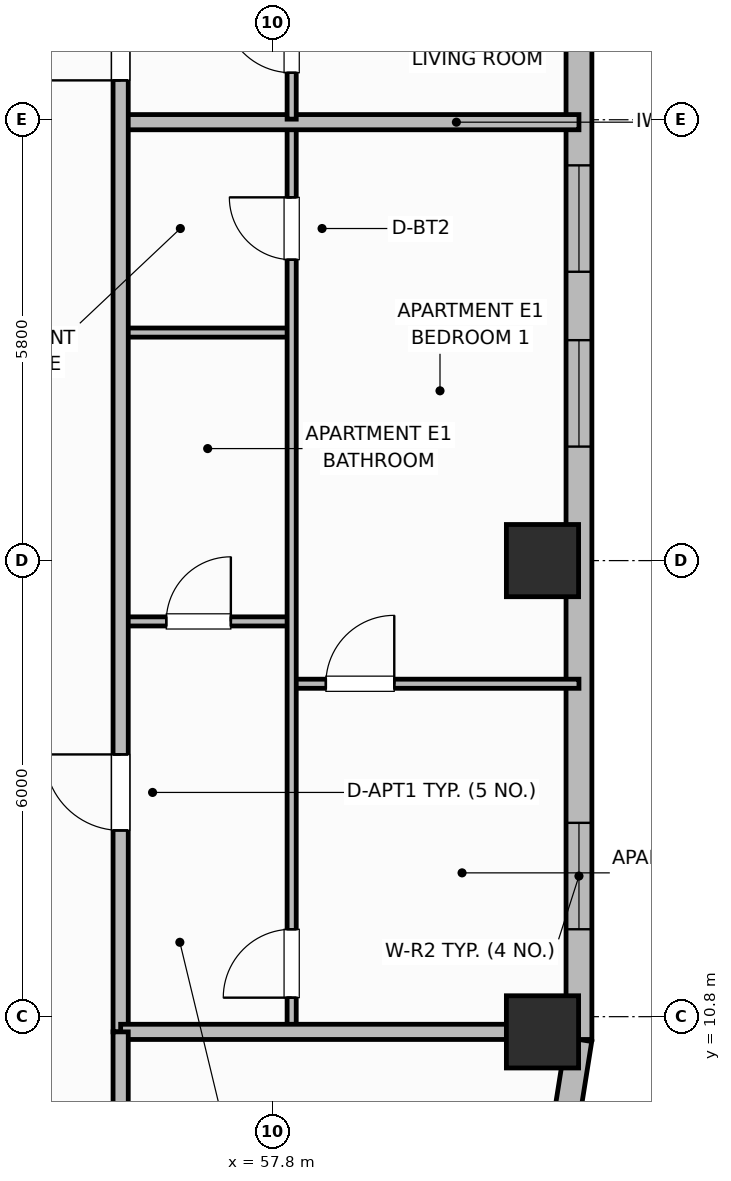
"""IFC4 building model, lengths in metres.
Left out: names, types, materials, properties, quantities, classifications, styles, units other than length and angle.
Written with IfcOpenShell. Run it as: python <this file> out.ifc"""

import sys

from ifc_helpers import new_model, si_unit, direction, frame, frame_2d, origin, origin_2d, place, context, subcontext, project, spatial, rectangle, extrude, element, fill, save


model = new_model("IFC4")
c1 = context("Model", 3, precision=1e-05, world=origin(), true_north=direction((0.0, 1.0)))
c2 = subcontext(c1, "Body", "Model", "MODEL_VIEW")
j1 = project(units=[si_unit("LENGTHUNIT", "METRE"), si_unit("PLANEANGLEUNIT", "RADIAN")], contexts=[c1])
p1 = place(None, origin())
s1 = spatial("IfcSite", under=j1, at=p1, CompositionType="ELEMENT")
p2 = place(p1, origin())
s2 = spatial("IfcBuilding", under=s1, at=p2, CompositionType="ELEMENT")
p3 = place(p2, frame((0.0, 0.0, 147.8)))
s3 = spatial("IfcBuildingStorey", under=s2, at=p3, CompositionType="ELEMENT", Elevation=147.8)
for number, where, z_axis, x_axis in (
    (1, (61.35, 10.6, 0.0), (0.0, 0.0, 1.0), (1.0, 0.0, 0.0)),
    (2, (61.35, 16.8, 0.0), (0.0, 0.0, 1.0), (1.0, 0.0, 0.0)),
):
    element("IfcColumn", number, at=place(p3, frame(where, z_axis=z_axis, x_axis=x_axis)), inside=s3, PredefinedType="COLUMN", context=c2, shape_type="SweptSolid", body=[
        extrude(rectangle(XDim=0.95, YDim=0.95, at=origin_2d()), origin(), (0.0, 0.0, 1.0), 3.7),
    ])
p4 = place(p3, frame((61.652, 9.378, 0.0), z_axis=(0.0, 0.0, 1.0), x_axis=(0.156514556949, 0.987675651954, 0.0)))
e3 = element("IfcWall", 3, at=p4, inside=s3, PredefinedType="SOLIDWALL", context=c2, shape_type="SweptSolid", body=[
    extrude(rectangle(XDim=1.135, YDim=0.34, at=frame_2d((0.568, 0.0))), origin(), (0.0, 0.0, 1.0), 2.72),
])
p5 = place(p3, frame((61.83, 10.5, 0.0), z_axis=(0.0, 0.0, 1.0), x_axis=(0.0, 1.0, 0.0)))
e4 = element("IfcWall", 4, at=p5, inside=s3, PredefinedType="SOLIDWALL", context=c2, shape_type="SweptSolid", body=[
    extrude(rectangle(XDim=13.3, YDim=0.34, at=frame_2d((6.65, 0.0))), origin(), (0.0, 0.0, 1.0), 2.72),
])
p6 = place(p5, frame((1.45, 0.0, 0.75)))
e5 = element("IfcOpeningElement", 5, at=p6, cuts=e4, PredefinedType="OPENING", context=c2, shape_type="SweptSolid", body=[
    extrude(rectangle(XDim=1.4, YDim=1.85, at=frame_2d((0.7, 0.925))), frame((0.0, 0.18, 0.0), z_axis=(0.0, -1.0, 0.0), x_axis=(1.0, 0.0, 0.0)), (0.0, 0.0, 1.0), 0.36),
])
p7 = place(p5, frame((7.8, 0.0, 0.75)))
e6 = element("IfcOpeningElement", 6, at=p7, cuts=e4, PredefinedType="OPENING", context=c2, shape_type="SweptSolid", body=[
    extrude(rectangle(XDim=1.4, YDim=1.85, at=frame_2d((0.7, 0.925))), frame((0.0, 0.18, 0.0), z_axis=(0.0, -1.0, 0.0), x_axis=(1.0, 0.0, 0.0)), (0.0, 0.0, 1.0), 0.36),
])
p8 = place(p5, frame((10.1, 0.0, 0.75)))
e7 = element("IfcOpeningElement", 7, at=p8, cuts=e4, PredefinedType="OPENING", context=c2, shape_type="SweptSolid", body=[
    extrude(rectangle(XDim=1.4, YDim=1.85, at=frame_2d((0.7, 0.925))), frame((0.0, 0.18, 0.0), z_axis=(0.0, -1.0, 0.0), x_axis=(1.0, 0.0, 0.0)), (0.0, 0.0, 1.0), 0.36),
])
p9 = place(p3, frame((55.8, 16.0, 0.0), z_axis=(0.0, 0.0, 1.0), x_axis=(1.0, 0.0, 0.0)))
e8 = element("IfcWall", 8, at=p9, inside=s3, PredefinedType="PARTITIONING", context=c2, shape_type="SweptSolid", body=[
    extrude(rectangle(XDim=2.25, YDim=0.12, at=frame_2d((1.125, 0.0))), origin(), (0.0, 0.0, 1.0), 2.55),
])
p10 = place(p9, frame((0.6, 0.0, 0.0)))
e9 = element("IfcOpeningElement", 9, at=p10, cuts=e8, PredefinedType="OPENING", context=c2, shape_type="SweptSolid", body=[
    extrude(rectangle(XDim=0.85, YDim=2.1, at=frame_2d((0.425, 1.05))), frame((0.0, 0.07, 0.0), z_axis=(0.0, -1.0, 0.0), x_axis=(1.0, 0.0, 0.0)), (0.0, 0.0, 1.0), 0.14),
])
p11 = place(p3, frame((55.8, 19.8, 0.0), z_axis=(0.0, 0.0, 1.0), x_axis=(1.0, 0.0, 0.0)))
e10 = element("IfcWall", 10, at=p11, inside=s3, PredefinedType="PARTITIONING", context=c2, shape_type="SweptSolid", body=[
    extrude(rectangle(XDim=2.25, YDim=0.12, at=frame_2d((1.125, 0.0))), origin(), (0.0, 0.0, 1.0), 2.55),
])
p12 = place(p3, frame((58.05, 15.18, 0.0), z_axis=(0.0, 0.0, 1.0), x_axis=(1.0, 0.0, 0.0)))
e11 = element("IfcWall", 11, at=p12, inside=s3, PredefinedType="PARTITIONING", context=c2, shape_type="SweptSolid", body=[
    extrude(rectangle(XDim=3.78, YDim=0.12, at=frame_2d((1.89, 0.0))), origin(), (0.0, 0.0, 1.0), 2.55),
])
p13 = place(p12, frame((0.45, 0.0, 0.0)))
e12 = element("IfcOpeningElement", 12, at=p13, cuts=e11, PredefinedType="OPENING", context=c2, shape_type="SweptSolid", body=[
    extrude(rectangle(XDim=0.9, YDim=2.1, at=frame_2d((0.45, 1.05))), frame((0.0, 0.07, 0.0), z_axis=(0.0, -1.0, 0.0), x_axis=(1.0, 0.0, 0.0)), (0.0, 0.0, 1.0), 0.14),
])
p14 = place(p3, frame((58.05, 10.64, 0.0), z_axis=(0.0, 0.0, 1.0), x_axis=(0.0, 1.0, 0.0)))
e13 = element("IfcWall", 13, at=p14, inside=s3, PredefinedType="PARTITIONING", context=c2, shape_type="SweptSolid", body=[
    extrude(rectangle(XDim=11.888, YDim=0.12, at=frame_2d((5.944, 0.0))), origin(), (0.0, 0.0, 1.0), 2.55),
])
p15 = place(p14, frame((0.41, 0.0, 0.0)))
e14 = element("IfcOpeningElement", 14, at=p15, cuts=e13, PredefinedType="OPENING", context=c2, shape_type="SweptSolid", body=[
    extrude(rectangle(XDim=0.9, YDim=2.1, at=frame_2d((0.45, 1.05))), frame((0.0, 0.07, 0.0), z_axis=(0.0, -1.0, 0.0), x_axis=(1.0, 0.0, 0.0)), (0.0, 0.0, 1.0), 0.14),
])
p16 = place(p14, frame((10.119, 0.0, 0.0)))
e15 = element("IfcOpeningElement", 15, at=p16, cuts=e13, PredefinedType="OPENING", context=c2, shape_type="SweptSolid", body=[
    extrude(rectangle(XDim=0.82, YDim=2.08, at=frame_2d((0.41, 1.04))), frame((0.0, 0.07, 0.0), z_axis=(0.0, -1.0, 0.0), x_axis=(1.0, 0.0, 0.0)), (0.0, 0.0, 1.0), 0.14),
])
p17 = place(p3, frame((55.8, 22.568, 0.0), z_axis=(0.0, 0.0, 1.0), x_axis=(1.0, 0.0, 0.0)))
e16 = element("IfcWall", 16, at=p17, inside=s3, PredefinedType="PARTITIONING", context=c2, shape_type="SweptSolid", body=[
    extrude(rectangle(XDim=6.03, YDim=0.2, at=frame_2d((3.015, 0.0))), origin(), (0.0, 0.0, 1.0), 2.55),
])
p18 = place(p3, frame((58.05, 22.608, 0.0), z_axis=(0.0, 0.0, 1.0), x_axis=(0.0, 1.0, 0.0)))
e17 = element("IfcWall", 17, at=p18, inside=s3, PredefinedType="PARTITIONING", context=c2, shape_type="SweptSolid", body=[
    extrude(rectangle(XDim=11.052, YDim=0.12, at=frame_2d((5.526, 0.0))), origin(), (0.0, 0.0, 1.0), 2.55),
])
p19 = place(p18, frame((0.61, 0.0, 0.0)))
e18 = element("IfcOpeningElement", 18, at=p19, cuts=e17, PredefinedType="OPENING", context=c2, shape_type="SweptSolid", body=[
    extrude(rectangle(XDim=0.9, YDim=2.1, at=frame_2d((0.45, 1.05))), frame((0.0, 0.07, 0.0), z_axis=(0.0, -1.0, 0.0), x_axis=(1.0, 0.0, 0.0)), (0.0, 0.0, 1.0), 0.14),
])
p20 = place(p3, frame((55.8, 10.6, 0.0), z_axis=(0.0, 0.0, 1.0), x_axis=(0.0, 1.0, 0.0)))
e19 = element("IfcWall", 19, at=p20, inside=s3, PredefinedType="PARTITIONING", context=c2, shape_type="SweptSolid", body=[
    extrude(rectangle(XDim=35.2, YDim=0.2, at=frame_2d((17.6, 0.0))), origin(), (0.0, 0.0, 1.0), 2.55),
])
p21 = place(p20, frame((2.65, 0.0, 0.0)))
e20 = element("IfcOpeningElement", 20, at=p21, cuts=e19, PredefinedType="OPENING", context=c2, shape_type="SweptSolid", body=[
    extrude(rectangle(XDim=1.0, YDim=2.15, at=frame_2d((0.5, 1.075))), frame((0.0, 0.11, 0.0), z_axis=(0.0, -1.0, 0.0), x_axis=(1.0, 0.0, 0.0)), (0.0, 0.0, 1.0), 0.22),
])
p22 = place(p20, frame((12.518, 0.0, 0.0)))
e21 = element("IfcOpeningElement", 21, at=p22, cuts=e19, PredefinedType="OPENING", context=c2, shape_type="SweptSolid", body=[
    extrude(rectangle(XDim=1.0, YDim=2.15, at=frame_2d((0.5, 1.075))), frame((0.0, 0.11, 0.0), z_axis=(0.0, -1.0, 0.0), x_axis=(1.0, 0.0, 0.0)), (0.0, 0.0, 1.0), 0.22),
])
p23 = place(p20, frame((23.65, 0.0, 0.0)))
e22 = element("IfcOpeningElement", 22, at=p23, cuts=e19, PredefinedType="OPENING", context=c2, shape_type="SweptSolid", body=[
    extrude(rectangle(XDim=1.0, YDim=2.15, at=frame_2d((0.5, 1.075))), frame((0.0, 0.11, 0.0), z_axis=(0.0, -1.0, 0.0), x_axis=(1.0, 0.0, 0.0)), (0.0, 0.0, 1.0), 0.22),
])
p24 = place(p3, frame((55.8, 10.6, 0.0), z_axis=(0.0, 0.0, 1.0), x_axis=(1.0, 0.0, 0.0)))
e23 = element("IfcWall", 23, at=p24, inside=s3, PredefinedType="PARTITIONING", context=c2, shape_type="SweptSolid", body=[
    extrude(rectangle(XDim=5.61, YDim=0.2, at=frame_2d((2.805, 0.0))), origin(), (0.0, 0.0, 1.0), 2.55),
])
p25 = place(p3, frame((55.8, 6.87, 0.0), z_axis=(0.0, 0.0, 1.0), x_axis=(0.0, 1.0, 0.0)))
e24 = element("IfcWall", 24, at=p25, inside=s3, PredefinedType="PARTITIONING", context=c2, shape_type="SweptSolid", body=[
    extrude(rectangle(XDim=3.73, YDim=0.2, at=frame_2d((1.865, 0.0))), origin(), (0.0, 0.0, 1.0), 2.55),
])
p26 = place(p6, origin())
e25 = element("IfcWindow", 25, at=p26, inside=s3, PartitioningType="SINGLE_PANEL", PredefinedType="WINDOW", context=c2, shape_type="SweptSolid", body=[
    extrude(rectangle(XDim=1.4, YDim=1.85, at=frame_2d((0.7, 0.925))), frame((0.0, 0.03, 0.0), z_axis=(0.0, -1.0, 0.0), x_axis=(1.0, 0.0, 0.0)), (0.0, 0.0, 1.0), 0.06),
])
fill(e5, e25)
p27 = place(p7, origin())
e26 = element("IfcWindow", 26, at=p27, inside=s3, PartitioningType="SINGLE_PANEL", PredefinedType="WINDOW", context=c2, shape_type="SweptSolid", body=[
    extrude(rectangle(XDim=1.4, YDim=1.85, at=frame_2d((0.7, 0.925))), frame((0.0, 0.03, 0.0), z_axis=(0.0, -1.0, 0.0), x_axis=(1.0, 0.0, 0.0)), (0.0, 0.0, 1.0), 0.06),
])
fill(e6, e26)
p28 = place(p8, origin())
e27 = element("IfcWindow", 27, at=p28, inside=s3, PartitioningType="SINGLE_PANEL", PredefinedType="WINDOW", context=c2, shape_type="SweptSolid", body=[
    extrude(rectangle(XDim=1.4, YDim=1.85, at=frame_2d((0.7, 0.925))), frame((0.0, 0.03, 0.0), z_axis=(0.0, -1.0, 0.0), x_axis=(1.0, 0.0, 0.0)), (0.0, 0.0, 1.0), 0.06),
])
fill(e7, e27)
p29 = place(p10, origin())
e28 = element("IfcDoor", 28, at=p29, inside=s3, OperationType="SINGLE_SWING_RIGHT", PredefinedType="DOOR", context=c2, shape_type="SweptSolid", body=[
    extrude(rectangle(XDim=0.85, YDim=2.1, at=frame_2d((0.425, 1.05))), frame((0.0, 0.025, 0.0), z_axis=(0.0, -1.0, 0.0), x_axis=(1.0, 0.0, 0.0)), (0.0, 0.0, 1.0), 0.05),
])
fill(e9, e28)
p30 = place(p13, origin())
e29 = element("IfcDoor", 29, at=p30, inside=s3, OperationType="SINGLE_SWING_RIGHT", PredefinedType="DOOR", context=c2, shape_type="SweptSolid", body=[
    extrude(rectangle(XDim=0.9, YDim=2.1, at=frame_2d((0.45, 1.05))), frame((0.0, 0.025, 0.0), z_axis=(0.0, -1.0, 0.0), x_axis=(1.0, 0.0, 0.0)), (0.0, 0.0, 1.0), 0.05),
])
fill(e12, e29)
p31 = place(p15, origin())
e30 = element("IfcDoor", 30, at=p31, inside=s3, OperationType="SINGLE_SWING_LEFT", PredefinedType="DOOR", context=c2, shape_type="SweptSolid", body=[
    extrude(rectangle(XDim=0.9, YDim=2.1, at=frame_2d((0.45, 1.05))), frame((0.0, 0.025, 0.0), z_axis=(0.0, -1.0, 0.0), x_axis=(1.0, 0.0, 0.0)), (0.0, 0.0, 1.0), 0.05),
])
fill(e14, e30)
p32 = place(p16, origin())
e31 = element("IfcDoor", 31, at=p32, inside=s3, OperationType="SINGLE_SWING_RIGHT", PredefinedType="DOOR", context=c2, shape_type="SweptSolid", body=[
    extrude(rectangle(XDim=0.82, YDim=2.08, at=frame_2d((0.41, 1.04))), frame((0.0, 0.025, 0.0), z_axis=(0.0, -1.0, 0.0), x_axis=(1.0, 0.0, 0.0)), (0.0, 0.0, 1.0), 0.05),
])
fill(e15, e31)
p33 = place(p19, origin())
e32 = element("IfcDoor", 32, at=p33, inside=s3, OperationType="SINGLE_SWING_RIGHT", PredefinedType="DOOR", context=c2, shape_type="SweptSolid", body=[
    extrude(rectangle(XDim=0.9, YDim=2.1, at=frame_2d((0.45, 1.05))), frame((0.0, 0.025, 0.0), z_axis=(0.0, -1.0, 0.0), x_axis=(1.0, 0.0, 0.0)), (0.0, 0.0, 1.0), 0.05),
])
fill(e18, e32)
p34 = place(p21, origin())
e33 = element("IfcDoor", 33, at=p34, inside=s3, OperationType="SINGLE_SWING_RIGHT", PredefinedType="DOOR", context=c2, shape_type="SweptSolid", body=[
    extrude(rectangle(XDim=1.0, YDim=2.15, at=frame_2d((0.5, 1.075))), frame((0.0, 0.025, 0.0), z_axis=(0.0, -1.0, 0.0), x_axis=(1.0, 0.0, 0.0)), (0.0, 0.0, 1.0), 0.05),
])
fill(e20, e33)
p35 = place(p22, origin())
e34 = element("IfcDoor", 34, at=p35, inside=s3, OperationType="SINGLE_SWING_LEFT", PredefinedType="DOOR", context=c2, shape_type="SweptSolid", body=[
    extrude(rectangle(XDim=1.0, YDim=2.15, at=frame_2d((0.5, 1.075))), frame((0.0, 0.025, 0.0), z_axis=(0.0, -1.0, 0.0), x_axis=(1.0, 0.0, 0.0)), (0.0, 0.0, 1.0), 0.05),
])
fill(e21, e34)
save(model, sys.argv[1])
